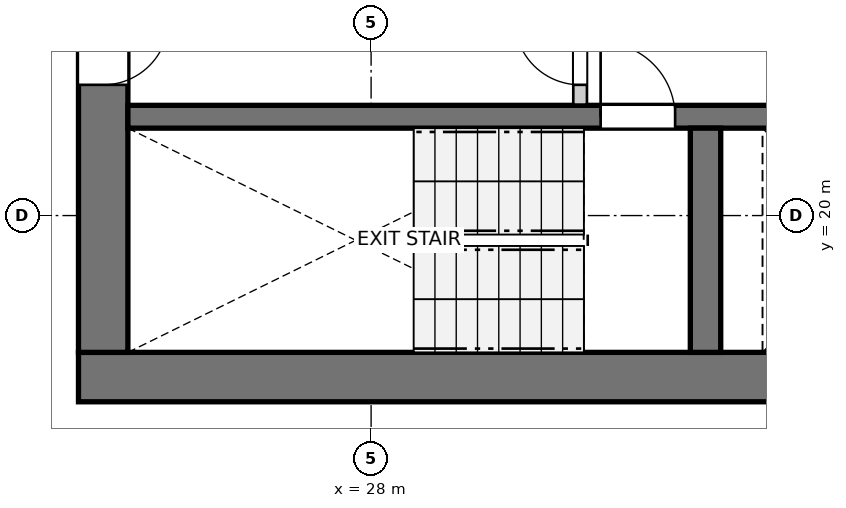
"""IFC4 building model, lengths in metres.
Left out: names, types, materials, properties, quantities, classifications, styles, units other than length and angle.
Written with IfcOpenShell. Run it as: python <this file> out.ifc"""

import sys

from ifc_helpers import new_model, si_unit, direction, frame, frame_2d, origin, place, context, subcontext, project, spatial, rectangle, extrude, source, transform, mapped, element, fill, save


model = new_model("IFC4")
c1 = context("Model", 3, precision=1e-05, world=origin(), true_north=direction((0.0, 1.0)))
c2 = subcontext(c1, "Body", "Model", "MODEL_VIEW")
j1 = project(units=[si_unit("LENGTHUNIT", "METRE"), si_unit("PLANEANGLEUNIT", "RADIAN")], contexts=[c1])
p1 = place(None, origin())
s1 = spatial("IfcSite", under=j1, at=p1, CompositionType="ELEMENT")
p2 = place(p1, origin())
s2 = spatial("IfcBuilding", under=s1, at=p2, CompositionType="ELEMENT")
p3 = place(p2, frame((0.0, 0.0, 70.4)))
s3 = spatial("IfcBuildingStorey", under=s2, at=p3, CompositionType="ELEMENT", Elevation=70.4)
p4 = place(p3, frame((24.15, 17.875, 0.0), z_axis=(0.0, 0.0, 1.0), x_axis=(1.0, 0.0, 0.0)))
e1 = element("IfcWall", 1, at=p4, inside=s3, PredefinedType="SHEAR", context=c2, shape_type="SweptSolid", body=[
    extrude(rectangle(XDim=12.4, YDim=0.65, at=frame_2d((6.2, 0.0))), origin(), (0.0, 0.0, 1.0), 2.95),
])
p5 = place(p3, frame((24.475, 33.8, 0.0), z_axis=(0.0, 0.0, 1.0), x_axis=(0.0, -1.0, 0.0)))
e2 = element("IfcWall", 2, at=p5, inside=s3, PredefinedType="SHEAR", context=c2, shape_type="SweptSolid", body=[
    extrude(rectangle(XDim=15.6, YDim=0.65, at=frame_2d((7.8, 0.0))), origin(), (0.0, 0.0, 1.0), 2.95),
])
p6 = place(p5, frame((7.05, 0.0, 0.0)))
e3 = element("IfcOpeningElement", 3, at=p6, cuts=e2, PredefinedType="OPENING", context=c2, shape_type="SweptSolid", body=[
    extrude(rectangle(XDim=1.5, YDim=2.15, at=frame_2d((0.75, 1.075))), frame((0.0, 0.335, 0.0), z_axis=(0.0, -1.0, 0.0), x_axis=(1.0, 0.0, 0.0)), (0.0, 0.0, 1.0), 0.67),
])
p7 = place(p5, frame((3.52, 0.0, 0.0)))
e4 = element("IfcOpeningElement", 4, at=p7, cuts=e2, PredefinedType="OPENING", context=c2, shape_type="SweptSolid", body=[
    extrude(rectangle(XDim=0.86, YDim=2.05, at=frame_2d((0.43, 1.025))), frame((0.0, 0.335, 0.0), z_axis=(0.0, -1.0, 0.0), x_axis=(1.0, 0.0, 0.0)), (0.0, 0.0, 1.0), 0.67),
])
p8 = place(p5, frame((11.22, 0.0, 0.0)))
e5 = element("IfcOpeningElement", 5, at=p8, cuts=e2, PredefinedType="OPENING", context=c2, shape_type="SweptSolid", body=[
    extrude(rectangle(XDim=0.86, YDim=2.05, at=frame_2d((0.43, 1.025))), frame((0.0, 0.335, 0.0), z_axis=(0.0, -1.0, 0.0), x_axis=(1.0, 0.0, 0.0)), (0.0, 0.0, 1.0), 0.67),
])
p9 = place(p3, frame((24.8, 21.3, 0.0), z_axis=(0.0, 0.0, 1.0), x_axis=(1.0, 0.0, 0.0)))
e6 = element("IfcWall", 6, at=p9, inside=s3, PredefinedType="SHEAR", context=c2, shape_type="SweptSolid", body=[
    extrude(rectangle(XDim=11.1, YDim=0.3, at=frame_2d((5.55, 0.0))), origin(), (0.0, 0.0, 1.0), 2.95),
])
p10 = place(p9, frame((6.22, 0.0, 0.0)))
e7 = element("IfcOpeningElement", 7, at=p10, cuts=e6, PredefinedType="OPENING", context=c2, shape_type="SweptSolid", body=[
    extrude(rectangle(XDim=0.98, YDim=2.15, at=frame_2d((0.49, 1.075))), frame((0.0, 0.16, 0.0), z_axis=(0.0, -1.0, 0.0), x_axis=(1.0, 0.0, 0.0)), (0.0, 0.0, 1.0), 0.32),
])
p11 = place(p9, frame((9.15, 0.0, 0.0)))
e8 = element("IfcOpeningElement", 8, at=p11, cuts=e6, PredefinedType="OPENING", context=c2, shape_type="SweptSolid", body=[
    extrude(rectangle(XDim=1.15, YDim=2.15, at=frame_2d((0.575, 1.075))), frame((0.0, 0.16, 0.0), z_axis=(0.0, -1.0, 0.0), x_axis=(1.0, 0.0, 0.0)), (0.0, 0.0, 1.0), 0.32),
])
p12 = place(p3, frame((32.4, 18.2, 0.0), z_axis=(0.0, 0.0, 1.0), x_axis=(0.0, 1.0, 0.0)))
e9 = element("IfcWall", 9, at=p12, inside=s3, PredefinedType="SHEAR", context=c2, shape_type="SweptSolid", body=[
    extrude(rectangle(XDim=2.95, YDim=0.4, at=frame_2d((1.475, 0.0))), origin(), (0.0, 0.0, 1.0), 2.95),
])
p13 = place(p3, frame((30.75, 21.46, 0.0), z_axis=(0.0, 0.0, 1.0), x_axis=(0.0, 1.0, 0.0)))
e10 = element("IfcWall", 10, at=p13, inside=s3, PredefinedType="PARTITIONING", context=c2, shape_type="SweptSolid", body=[
    extrude(rectangle(XDim=3.11, YDim=0.18, at=frame_2d((1.555, 0.0))), origin(), (0.0, 0.0, 1.0), 2.95),
])
p14 = place(p13, frame((0.26, 0.0, 0.0)))
e11 = element("IfcOpeningElement", 11, at=p14, cuts=e10, PredefinedType="OPENING", context=c2, shape_type="SweptSolid", body=[
    extrude(rectangle(XDim=0.86, YDim=2.05, at=frame_2d((0.43, 1.025))), frame((0.0, 0.1, 0.0), z_axis=(0.0, -1.0, 0.0), x_axis=(1.0, 0.0, 0.0)), (0.0, 0.0, 1.0), 0.2),
])
m1 = source(origin(), c2, "Body", "SweptSolid", [
    extrude(rectangle(XDim=0.98, YDim=2.15, at=frame_2d((0.49, 1.075))), frame((0.0, 0.025, 0.0), z_axis=(0.0, -1.0, 0.0), x_axis=(1.0, 0.0, 0.0)), (0.0, 0.0, 1.0), 0.05),
])
p15 = place(p10, origin())
e12 = element("IfcDoor", 12, at=p15, inside=s3, OperationType="SINGLE_SWING_LEFT", PredefinedType="DOOR", context=c2, shape_type="MappedRepresentation", body=[
    mapped(m1, transform((0.0, 0.0, 0.0), x_axis=(1.0, 0.0, 0.0), y_axis=(0.0, 1.0, 0.0), z_axis=(0.0, 0.0, 1.0), scale=1.0)),
])
fill(e7, e12)
m2 = source(origin(), c2, "Body", "SweptSolid", [
    extrude(rectangle(XDim=0.86, YDim=2.05, at=frame_2d((0.43, 1.025))), frame((0.0, 0.025, 0.0), z_axis=(0.0, -1.0, 0.0), x_axis=(1.0, 0.0, 0.0)), (0.0, 0.0, 1.0), 0.05),
])
p16 = place(p8, origin())
e13 = element("IfcDoor", 13, at=p16, inside=s3, OperationType="SINGLE_SWING_LEFT", PredefinedType="DOOR", context=c2, shape_type="MappedRepresentation", body=[
    mapped(m2, transform((0.0, 0.0, 0.0), x_axis=(1.0, 0.0, 0.0), y_axis=(0.0, 1.0, 0.0), z_axis=(0.0, 0.0, 1.0), scale=1.0)),
])
fill(e5, e13)
p17 = place(p14, origin())
e14 = element("IfcDoor", 14, at=p17, inside=s3, OperationType="SINGLE_SWING_RIGHT", PredefinedType="DOOR", context=c2, shape_type="MappedRepresentation", body=[
    mapped(m2, transform((0.0, 0.0, 0.0), x_axis=(1.0, 0.0, 0.0), y_axis=(0.0, 1.0, 0.0), z_axis=(0.0, 0.0, 1.0), scale=1.0)),
])
fill(e11, e14)
save(model, sys.argv[1])
